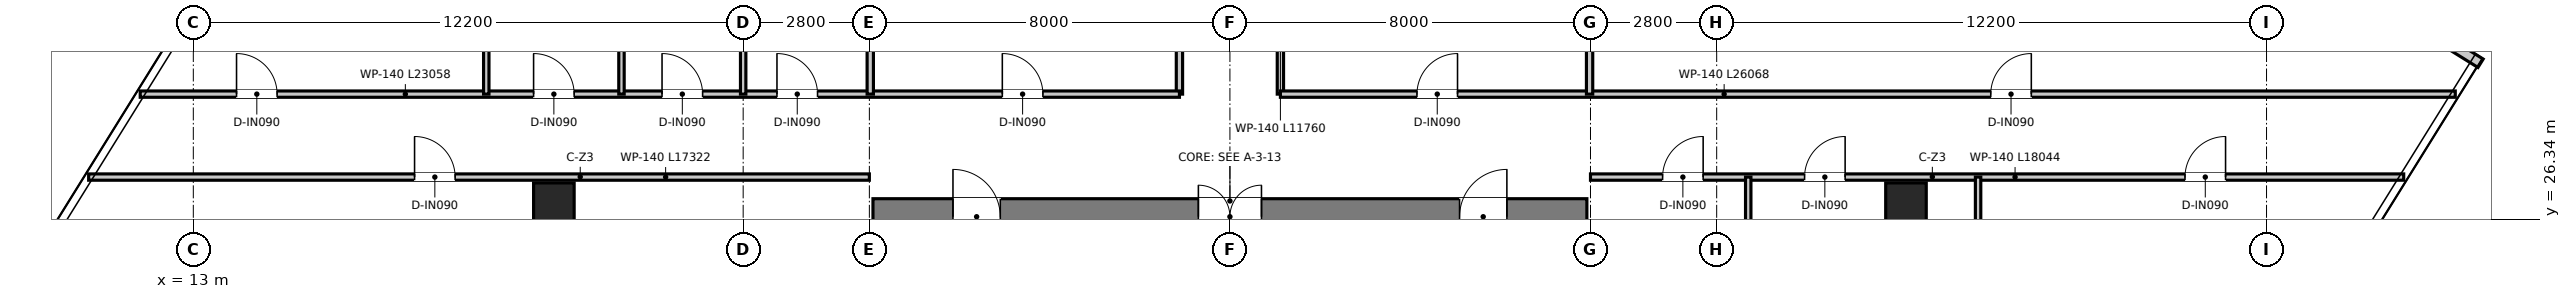
"""IFC4 building model, lengths in metres.
Left out: names, types, materials, properties, quantities, classifications, styles, units other than length and angle.
Written with IfcOpenShell. Run it as: python <this file> out.ifc"""

import sys

from ifc_helpers import new_model, si_unit, direction, frame, frame_2d, origin, origin_2d, place, context, subcontext, project, spatial, rectangle, extrude, source, transform, mapped, element, fill, save


model = new_model("IFC4")
c1 = context("Model", 3, precision=1e-05, world=origin(), true_north=direction((0.0, 1.0)))
c2 = subcontext(c1, "Body", "Model", "MODEL_VIEW")
j1 = project(units=[si_unit("LENGTHUNIT", "METRE"), si_unit("PLANEANGLEUNIT", "RADIAN")], contexts=[c1])
p1 = place(None, origin())
s1 = spatial("IfcSite", under=j1, at=p1, CompositionType="ELEMENT")
p2 = place(p1, origin())
s2 = spatial("IfcBuilding", under=s1, at=p2, CompositionType="ELEMENT")
p3 = place(p2, frame((0.0, 0.0, 177.8)))
s3 = spatial("IfcBuildingStorey", under=s2, at=p3, CompositionType="ELEMENT", Elevation=177.8)
p4 = place(p3, frame((28.08, 26.4, 0.0), z_axis=(0.0, 0.0, 1.0), x_axis=(1.0, 0.0, 0.0)))
e1 = element("IfcWall", 1, at=p4, inside=s3, PredefinedType="SHEAR", context=c2, shape_type="SweptSolid", body=[
    extrude(rectangle(XDim=15.84, YDim=0.8, at=frame_2d((7.92, 0.0))), origin(), (0.0, 0.0, 1.0), 3.95),
])
p5 = place(p4, frame((7.22, 0.0, 0.0)))
e2 = element("IfcOpeningElement", 2, at=p5, cuts=e1, PredefinedType="OPENING", context=c2, shape_type="SweptSolid", body=[
    extrude(rectangle(XDim=1.4, YDim=2.2, at=frame_2d((0.7, 1.1))), frame((0.0, 0.41, 0.0), z_axis=(0.0, -1.0, 0.0), x_axis=(1.0, 0.0, 0.0)), (0.0, 0.0, 1.0), 0.82),
])
p6 = place(p4, frame((1.775, 0.0, 0.0)))
e3 = element("IfcOpeningElement", 3, at=p6, cuts=e1, PredefinedType="OPENING", context=c2, shape_type="SweptSolid", body=[
    extrude(rectangle(XDim=1.05, YDim=2.1, at=frame_2d((0.525, 1.05))), frame((0.0, 0.41, 0.0), z_axis=(0.0, -1.0, 0.0), x_axis=(1.0, 0.0, 0.0)), (0.0, 0.0, 1.0), 0.82),
])
p7 = place(p4, frame((13.015, 0.0, 0.0)))
e4 = element("IfcOpeningElement", 4, at=p7, cuts=e1, PredefinedType="OPENING", context=c2, shape_type="SweptSolid", body=[
    extrude(rectangle(XDim=1.05, YDim=2.1, at=frame_2d((0.525, 1.05))), frame((0.0, 0.41, 0.0), z_axis=(0.0, -1.0, 0.0), x_axis=(1.0, 0.0, 0.0)), (0.0, 0.0, 1.0), 0.82),
])
m1 = source(origin(), c2, "Body", "SweptSolid", [
    extrude(rectangle(XDim=0.9, YDim=0.9, at=origin_2d()), origin(), (0.0, 0.0, 1.0), 3.95),
])
for number, where, z_axis, x_axis in (
    (5, (21.0, 26.7, 0.0), (0.0, 0.0, 1.0), (1.0, 0.0, 0.0)),
    (6, (51.0, 26.7, 0.0), (0.0, 0.0, 1.0), (1.0, 0.0, 0.0)),
):
    element("IfcColumn", number, at=place(p3, frame(where, z_axis=z_axis, x_axis=x_axis)), inside=s3, PredefinedType="COLUMN", context=c2, shape_type="MappedRepresentation", body=[
        mapped(m1, transform((0.0, 0.0, 0.0), x_axis=(1.0, 0.0, 0.0), y_axis=(0.0, 1.0, 0.0), z_axis=(0.0, 0.0, 1.0), scale=1.0)),
    ])
p8 = place(p3, frame((63.749, 29.805, 0.0), z_axis=(0.0, 0.0, 1.0), x_axis=(-0.84921299194, 0.528050465694, 0.0)))
e7 = element("IfcWall", 7, at=p8, inside=s3, PredefinedType="ELEMENTEDWALL", context=c2, shape_type="SweptSolid", body=[
    extrude(rectangle(XDim=4.745, YDim=0.22, at=frame_2d((2.373, 0.0))), origin(), (0.0, 0.0, 1.0), 3.67),
])
p9 = place(p3, frame((34.88, 29.12, 0.0), z_axis=(0.0, 0.0, 1.0), x_axis=(0.0, 1.0, 0.0)))
e8 = element("IfcWall", 8, at=p9, inside=s3, PredefinedType="PARTITIONING", context=c2, shape_type="SweptSolid", body=[
    extrude(rectangle(XDim=11.76, YDim=0.14, at=frame_2d((5.88, 0.0))), origin(), (0.0, 0.0, 1.0), 3.03),
])
p10 = place(p9, frame((3.205, 0.0, 0.0)))
e9 = element("IfcOpeningElement", 9, at=p10, cuts=e8, PredefinedType="OPENING", context=c2, shape_type="SweptSolid", body=[
    extrude(rectangle(XDim=0.95, YDim=2.1, at=frame_2d((0.475, 1.05))), frame((0.0, 0.08, 0.0), z_axis=(0.0, -1.0, 0.0), x_axis=(1.0, 0.0, 0.0)), (0.0, 0.0, 1.0), 0.16),
])
p11 = place(p9, frame((8.02, 0.0, 0.0)))
e10 = element("IfcOpeningElement", 10, at=p11, cuts=e8, PredefinedType="OPENING", context=c2, shape_type="SweptSolid", body=[
    extrude(rectangle(XDim=0.9, YDim=2.1, at=frame_2d((0.45, 1.05))), frame((0.0, 0.08, 0.0), z_axis=(0.0, -1.0, 0.0), x_axis=(1.0, 0.0, 0.0)), (0.0, 0.0, 1.0), 0.16),
])
p12 = place(p3, frame((37.12, 29.12, 0.0), z_axis=(0.0, 0.0, 1.0), x_axis=(0.0, 1.0, 0.0)))
e11 = element("IfcWall", 11, at=p12, inside=s3, PredefinedType="PARTITIONING", context=c2, shape_type="SweptSolid", body=[
    extrude(rectangle(XDim=11.76, YDim=0.14, at=frame_2d((5.88, 0.0))), origin(), (0.0, 0.0, 1.0), 3.03),
])
p13 = place(p12, frame((4.085, 0.0, 0.0)))
e12 = element("IfcOpeningElement", 12, at=p13, cuts=e11, PredefinedType="OPENING", context=c2, shape_type="SweptSolid", body=[
    extrude(rectangle(XDim=0.95, YDim=2.1, at=frame_2d((0.475, 1.05))), frame((0.0, 0.08, 0.0), z_axis=(0.0, -1.0, 0.0), x_axis=(1.0, 0.0, 0.0)), (0.0, 0.0, 1.0), 0.16),
])
p14 = place(p12, frame((6.82, 0.0, 0.0)))
e13 = element("IfcOpeningElement", 13, at=p14, cuts=e11, PredefinedType="OPENING", context=c2, shape_type="SweptSolid", body=[
    extrude(rectangle(XDim=0.9, YDim=2.1, at=frame_2d((0.45, 1.05))), frame((0.0, 0.08, 0.0), z_axis=(0.0, -1.0, 0.0), x_axis=(1.0, 0.0, 0.0)), (0.0, 0.0, 1.0), 0.16),
])
p15 = place(p12, frame((9.83, 0.0, 0.0)))
e14 = element("IfcOpeningElement", 14, at=p15, cuts=e11, PredefinedType="OPENING", context=c2, shape_type="SweptSolid", body=[
    extrude(rectangle(XDim=0.9, YDim=2.1, at=frame_2d((0.45, 1.05))), frame((0.0, 0.08, 0.0), z_axis=(0.0, -1.0, 0.0), x_axis=(1.0, 0.0, 0.0)), (0.0, 0.0, 1.0), 0.16),
])
p16 = place(p3, frame((11.822, 29.12, 0.0), z_axis=(0.0, 0.0, 1.0), x_axis=(1.0, 0.0, 0.0)))
e15 = element("IfcWall", 15, at=p16, inside=s3, PredefinedType="PARTITIONING", context=c2, shape_type="SweptSolid", body=[
    extrude(rectangle(XDim=23.058, YDim=0.14, at=frame_2d((11.529, 0.0))), origin(), (0.0, 0.0, 1.0), 3.03),
])
p17 = place(p16, frame((19.128, 0.0, 0.0)))
e16 = element("IfcOpeningElement", 16, at=p17, cuts=e15, PredefinedType="OPENING", context=c2, shape_type="SweptSolid", body=[
    extrude(rectangle(XDim=0.9, YDim=2.1, at=frame_2d((0.45, 1.05))), frame((0.0, 0.08, 0.0), z_axis=(0.0, -1.0, 0.0), x_axis=(1.0, 0.0, 0.0)), (0.0, 0.0, 1.0), 0.16),
])
p18 = place(p16, frame((2.137, 0.0, 0.0)))
e17 = element("IfcOpeningElement", 17, at=p18, cuts=e15, PredefinedType="OPENING", context=c2, shape_type="SweptSolid", body=[
    extrude(rectangle(XDim=0.9, YDim=2.1, at=frame_2d((0.45, 1.05))), frame((0.0, 0.08, 0.0), z_axis=(0.0, -1.0, 0.0), x_axis=(1.0, 0.0, 0.0)), (0.0, 0.0, 1.0), 0.16),
])
p19 = place(p16, frame((8.728, 0.0, 0.0)))
e18 = element("IfcOpeningElement", 18, at=p19, cuts=e15, PredefinedType="OPENING", context=c2, shape_type="SweptSolid", body=[
    extrude(rectangle(XDim=0.9, YDim=2.1, at=frame_2d((0.45, 1.05))), frame((0.0, 0.08, 0.0), z_axis=(0.0, -1.0, 0.0), x_axis=(1.0, 0.0, 0.0)), (0.0, 0.0, 1.0), 0.16),
])
p20 = place(p16, frame((11.578, 0.0, 0.0)))
e19 = element("IfcOpeningElement", 19, at=p20, cuts=e15, PredefinedType="OPENING", context=c2, shape_type="SweptSolid", body=[
    extrude(rectangle(XDim=0.9, YDim=2.1, at=frame_2d((0.45, 1.05))), frame((0.0, 0.08, 0.0), z_axis=(0.0, -1.0, 0.0), x_axis=(1.0, 0.0, 0.0)), (0.0, 0.0, 1.0), 0.16),
])
p21 = place(p16, frame((14.128, 0.0, 0.0)))
e20 = element("IfcOpeningElement", 20, at=p21, cuts=e15, PredefinedType="OPENING", context=c2, shape_type="SweptSolid", body=[
    extrude(rectangle(XDim=0.9, YDim=2.1, at=frame_2d((0.45, 1.05))), frame((0.0, 0.08, 0.0), z_axis=(0.0, -1.0, 0.0), x_axis=(1.0, 0.0, 0.0)), (0.0, 0.0, 1.0), 0.16),
])
p22 = place(p3, frame((37.12, 29.12, 0.0), z_axis=(0.0, 0.0, 1.0), x_axis=(1.0, 0.0, 0.0)))
e21 = element("IfcWall", 21, at=p22, inside=s3, PredefinedType="PARTITIONING", context=c2, shape_type="SweptSolid", body=[
    extrude(rectangle(XDim=26.068, YDim=0.14, at=frame_2d((13.034, 0.0))), origin(), (0.0, 0.0, 1.0), 3.03),
])
p23 = place(p22, frame((3.03, 0.0, 0.0)))
e22 = element("IfcOpeningElement", 22, at=p23, cuts=e21, PredefinedType="OPENING", context=c2, shape_type="SweptSolid", body=[
    extrude(rectangle(XDim=0.9, YDim=2.1, at=frame_2d((0.45, 1.05))), frame((0.0, 0.08, 0.0), z_axis=(0.0, -1.0, 0.0), x_axis=(1.0, 0.0, 0.0)), (0.0, 0.0, 1.0), 0.16),
])
p24 = place(p22, frame((15.761, 0.0, 0.0)))
e23 = element("IfcOpeningElement", 23, at=p24, cuts=e21, PredefinedType="OPENING", context=c2, shape_type="SweptSolid", body=[
    extrude(rectangle(XDim=0.9, YDim=2.1, at=frame_2d((0.45, 1.05))), frame((0.0, 0.08, 0.0), z_axis=(0.0, -1.0, 0.0), x_axis=(1.0, 0.0, 0.0)), (0.0, 0.0, 1.0), 0.16),
])
p25 = place(p3, frame((10.678, 27.28, 0.0), z_axis=(0.0, 0.0, 1.0), x_axis=(1.0, 0.0, 0.0)))
e24 = element("IfcWall", 24, at=p25, inside=s3, PredefinedType="PARTITIONING", context=c2, shape_type="SweptSolid", body=[
    extrude(rectangle(XDim=17.322, YDim=0.14, at=frame_2d((8.661, 0.0))), origin(), (0.0, 0.0, 1.0), 3.03),
])
p26 = place(p25, frame((7.231, 0.0, 0.0)))
e25 = element("IfcOpeningElement", 25, at=p26, cuts=e24, PredefinedType="OPENING", context=c2, shape_type="SweptSolid", body=[
    extrude(rectangle(XDim=0.9, YDim=2.1, at=frame_2d((0.45, 1.05))), frame((0.0, 0.08, 0.0), z_axis=(0.0, -1.0, 0.0), x_axis=(1.0, 0.0, 0.0)), (0.0, 0.0, 1.0), 0.16),
])
p27 = place(p3, frame((44.0, 27.28, 0.0), z_axis=(0.0, 0.0, 1.0), x_axis=(1.0, 0.0, 0.0)))
e26 = element("IfcWall", 26, at=p27, inside=s3, PredefinedType="PARTITIONING", context=c2, shape_type="SweptSolid", body=[
    extrude(rectangle(XDim=18.044, YDim=0.14, at=frame_2d((9.022, 0.0))), origin(), (0.0, 0.0, 1.0), 3.03),
])
p28 = place(p27, frame((1.6, 0.0, 0.0)))
e27 = element("IfcOpeningElement", 27, at=p28, cuts=e26, PredefinedType="OPENING", context=c2, shape_type="SweptSolid", body=[
    extrude(rectangle(XDim=0.9, YDim=2.1, at=frame_2d((0.45, 1.05))), frame((0.0, 0.08, 0.0), z_axis=(0.0, -1.0, 0.0), x_axis=(1.0, 0.0, 0.0)), (0.0, 0.0, 1.0), 0.16),
])
p29 = place(p27, frame((4.75, 0.0, 0.0)))
e28 = element("IfcOpeningElement", 28, at=p29, cuts=e26, PredefinedType="OPENING", context=c2, shape_type="SweptSolid", body=[
    extrude(rectangle(XDim=0.9, YDim=2.1, at=frame_2d((0.45, 1.05))), frame((0.0, 0.08, 0.0), z_axis=(0.0, -1.0, 0.0), x_axis=(1.0, 0.0, 0.0)), (0.0, 0.0, 1.0), 0.16),
])
p30 = place(p27, frame((13.191, 0.0, 0.0)))
e29 = element("IfcOpeningElement", 29, at=p30, cuts=e26, PredefinedType="OPENING", context=c2, shape_type="SweptSolid", body=[
    extrude(rectangle(XDim=0.9, YDim=2.1, at=frame_2d((0.45, 1.05))), frame((0.0, 0.08, 0.0), z_axis=(0.0, -1.0, 0.0), x_axis=(1.0, 0.0, 0.0)), (0.0, 0.0, 1.0), 0.16),
])
for number, where, z_axis, x_axis in (
    (30, (28.02, 29.12, 0.0), (0.0, 0.0, 1.0), (0.0, 1.0, 0.0)),
    (31, (43.98, 29.12, 0.0), (0.0, 0.0, 1.0), (0.0, 1.0, 0.0)),
):
    element("IfcWall", number, at=place(p3, frame(where, z_axis=z_axis, x_axis=x_axis)), inside=s3, PredefinedType="PARTITIONING", context=c2, shape_type="SweptSolid", body=[
        extrude(rectangle(XDim=5.46, YDim=0.14, at=frame_2d((2.73, 0.0))), origin(), (0.0, 0.0, 1.0), 3.31),
    ])
p31 = place(p3, frame((19.5, 29.12, 0.0), z_axis=(0.0, 0.0, 1.0), x_axis=(0.0, 1.0, 0.0)))
e32 = element("IfcWall", 32, at=p31, inside=s3, PredefinedType="PARTITIONING", context=c2, shape_type="SweptSolid", body=[
    extrude(rectangle(XDim=12.347, YDim=0.12, at=frame_2d((6.174, 0.0))), origin(), (0.0, 0.0, 1.0), 3.67),
])
p32 = place(p3, frame((22.5, 29.12, 0.0), z_axis=(0.0, 0.0, 1.0), x_axis=(0.0, 1.0, 0.0)))
e33 = element("IfcWall", 33, at=p32, inside=s3, PredefinedType="PARTITIONING", context=c2, shape_type="SweptSolid", body=[
    extrude(rectangle(XDim=17.172, YDim=0.12, at=frame_2d((8.586, 0.0))), origin(), (0.0, 0.0, 1.0), 3.08),
])
p33 = place(p3, frame((25.2, 29.12, 0.0), z_axis=(0.0, 0.0, 1.0), x_axis=(0.0, 1.0, 0.0)))
e34 = element("IfcWall", 34, at=p33, inside=s3, PredefinedType="PARTITIONING", context=c2, shape_type="SweptSolid", body=[
    extrude(rectangle(XDim=21.514, YDim=0.12, at=frame_2d((10.757, 0.0))), origin(), (0.0, 0.0, 1.0), 3.03),
])
p34 = place(p3, frame((47.5, 3.892, 0.0), z_axis=(0.0, 0.0, 1.0), x_axis=(0.0, 1.0, 0.0)))
e35 = element("IfcWall", 35, at=p34, inside=s3, PredefinedType="PARTITIONING", context=c2, shape_type="SweptSolid", body=[
    extrude(rectangle(XDim=23.388, YDim=0.12, at=frame_2d((11.694, 0.0))), origin(), (0.0, 0.0, 1.0), 3.08),
])
p35 = place(p3, frame((52.6, 12.094, 0.0), z_axis=(0.0, 0.0, 1.0), x_axis=(0.0, 1.0, 0.0)))
e36 = element("IfcWall", 36, at=p35, inside=s3, PredefinedType="PARTITIONING", context=c2, shape_type="SweptSolid", body=[
    extrude(rectangle(XDim=15.187, YDim=0.12, at=frame_2d((7.593, 0.0))), origin(), (0.0, 0.0, 1.0), 3.67),
])
p36 = place(p5, origin())
e37 = element("IfcDoor", 37, at=p36, inside=s3, OperationType="DOUBLE_DOOR_SINGLE_SWING", PredefinedType="DOOR", context=c2, shape_type="SweptSolid", body=[
    extrude(rectangle(XDim=1.4, YDim=2.2, at=frame_2d((0.7, 1.1))), frame((0.0, 0.025, 0.0), z_axis=(0.0, -1.0, 0.0), x_axis=(1.0, 0.0, 0.0)), (0.0, 0.0, 1.0), 0.05),
])
fill(e2, e37)
p37 = place(p6, origin())
e38 = element("IfcDoor", 38, at=p37, inside=s3, OperationType="SINGLE_SWING_LEFT", PredefinedType="DOOR", context=c2, shape_type="SweptSolid", body=[
    extrude(rectangle(XDim=1.05, YDim=2.1, at=frame_2d((0.525, 1.05))), frame((0.0, 0.025, 0.0), z_axis=(0.0, -1.0, 0.0), x_axis=(1.0, 0.0, 0.0)), (0.0, 0.0, 1.0), 0.05),
])
fill(e3, e38)
p38 = place(p7, origin())
e39 = element("IfcDoor", 39, at=p38, inside=s3, OperationType="SINGLE_SWING_RIGHT", PredefinedType="DOOR", context=c2, shape_type="SweptSolid", body=[
    extrude(rectangle(XDim=1.05, YDim=2.1, at=frame_2d((0.525, 1.05))), frame((0.0, 0.025, 0.0), z_axis=(0.0, -1.0, 0.0), x_axis=(1.0, 0.0, 0.0)), (0.0, 0.0, 1.0), 0.05),
])
fill(e4, e39)
p39 = place(p17, origin())
e40 = element("IfcDoor", 40, at=p39, inside=s3, OperationType="SINGLE_SWING_LEFT", PredefinedType="DOOR", context=c2, shape_type="SweptSolid", body=[
    extrude(rectangle(XDim=0.9, YDim=2.1, at=frame_2d((0.45, 1.05))), frame((0.0, 0.025, 0.0), z_axis=(0.0, -1.0, 0.0), x_axis=(1.0, 0.0, 0.0)), (0.0, 0.0, 1.0), 0.05),
])
fill(e16, e40)
p40 = place(p23, origin())
e41 = element("IfcDoor", 41, at=p40, inside=s3, OperationType="SINGLE_SWING_RIGHT", PredefinedType="DOOR", context=c2, shape_type="SweptSolid", body=[
    extrude(rectangle(XDim=0.9, YDim=2.1, at=frame_2d((0.45, 1.05))), frame((0.0, 0.025, 0.0), z_axis=(0.0, -1.0, 0.0), x_axis=(1.0, 0.0, 0.0)), (0.0, 0.0, 1.0), 0.05),
])
fill(e22, e41)
p41 = place(p18, origin())
e42 = element("IfcDoor", 42, at=p41, inside=s3, OperationType="SINGLE_SWING_LEFT", PredefinedType="DOOR", context=c2, shape_type="SweptSolid", body=[
    extrude(rectangle(XDim=0.9, YDim=2.1, at=frame_2d((0.45, 1.05))), frame((0.0, 0.025, 0.0), z_axis=(0.0, -1.0, 0.0), x_axis=(1.0, 0.0, 0.0)), (0.0, 0.0, 1.0), 0.05),
])
fill(e17, e42)
p42 = place(p19, origin())
e43 = element("IfcDoor", 43, at=p42, inside=s3, OperationType="SINGLE_SWING_LEFT", PredefinedType="DOOR", context=c2, shape_type="SweptSolid", body=[
    extrude(rectangle(XDim=0.9, YDim=2.1, at=frame_2d((0.45, 1.05))), frame((0.0, 0.025, 0.0), z_axis=(0.0, -1.0, 0.0), x_axis=(1.0, 0.0, 0.0)), (0.0, 0.0, 1.0), 0.05),
])
fill(e18, e43)
p43 = place(p20, origin())
e44 = element("IfcDoor", 44, at=p43, inside=s3, OperationType="SINGLE_SWING_LEFT", PredefinedType="DOOR", context=c2, shape_type="SweptSolid", body=[
    extrude(rectangle(XDim=0.9, YDim=2.1, at=frame_2d((0.45, 1.05))), frame((0.0, 0.025, 0.0), z_axis=(0.0, -1.0, 0.0), x_axis=(1.0, 0.0, 0.0)), (0.0, 0.0, 1.0), 0.05),
])
fill(e19, e44)
p44 = place(p21, origin())
e45 = element("IfcDoor", 45, at=p44, inside=s3, OperationType="SINGLE_SWING_LEFT", PredefinedType="DOOR", context=c2, shape_type="SweptSolid", body=[
    extrude(rectangle(XDim=0.9, YDim=2.1, at=frame_2d((0.45, 1.05))), frame((0.0, 0.025, 0.0), z_axis=(0.0, -1.0, 0.0), x_axis=(1.0, 0.0, 0.0)), (0.0, 0.0, 1.0), 0.05),
])
fill(e20, e45)
p45 = place(p24, origin())
e46 = element("IfcDoor", 46, at=p45, inside=s3, OperationType="SINGLE_SWING_RIGHT", PredefinedType="DOOR", context=c2, shape_type="SweptSolid", body=[
    extrude(rectangle(XDim=0.9, YDim=2.1, at=frame_2d((0.45, 1.05))), frame((0.0, 0.025, 0.0), z_axis=(0.0, -1.0, 0.0), x_axis=(1.0, 0.0, 0.0)), (0.0, 0.0, 1.0), 0.05),
])
fill(e23, e46)
p46 = place(p26, origin())
e47 = element("IfcDoor", 47, at=p46, inside=s3, OperationType="SINGLE_SWING_LEFT", PredefinedType="DOOR", context=c2, shape_type="SweptSolid", body=[
    extrude(rectangle(XDim=0.9, YDim=2.1, at=frame_2d((0.45, 1.05))), frame((0.0, 0.025, 0.0), z_axis=(0.0, -1.0, 0.0), x_axis=(1.0, 0.0, 0.0)), (0.0, 0.0, 1.0), 0.05),
])
fill(e25, e47)
p47 = place(p28, origin())
e48 = element("IfcDoor", 48, at=p47, inside=s3, OperationType="SINGLE_SWING_RIGHT", PredefinedType="DOOR", context=c2, shape_type="SweptSolid", body=[
    extrude(rectangle(XDim=0.9, YDim=2.1, at=frame_2d((0.45, 1.05))), frame((0.0, 0.025, 0.0), z_axis=(0.0, -1.0, 0.0), x_axis=(1.0, 0.0, 0.0)), (0.0, 0.0, 1.0), 0.05),
])
fill(e27, e48)
p48 = place(p29, origin())
e49 = element("IfcDoor", 49, at=p48, inside=s3, OperationType="SINGLE_SWING_RIGHT", PredefinedType="DOOR", context=c2, shape_type="SweptSolid", body=[
    extrude(rectangle(XDim=0.9, YDim=2.1, at=frame_2d((0.45, 1.05))), frame((0.0, 0.025, 0.0), z_axis=(0.0, -1.0, 0.0), x_axis=(1.0, 0.0, 0.0)), (0.0, 0.0, 1.0), 0.05),
])
fill(e28, e49)
p49 = place(p30, origin())
e50 = element("IfcDoor", 50, at=p49, inside=s3, OperationType="SINGLE_SWING_RIGHT", PredefinedType="DOOR", context=c2, shape_type="SweptSolid", body=[
    extrude(rectangle(XDim=0.9, YDim=2.1, at=frame_2d((0.45, 1.05))), frame((0.0, 0.025, 0.0), z_axis=(0.0, -1.0, 0.0), x_axis=(1.0, 0.0, 0.0)), (0.0, 0.0, 1.0), 0.05),
])
fill(e29, e50)
save(model, sys.argv[1])
